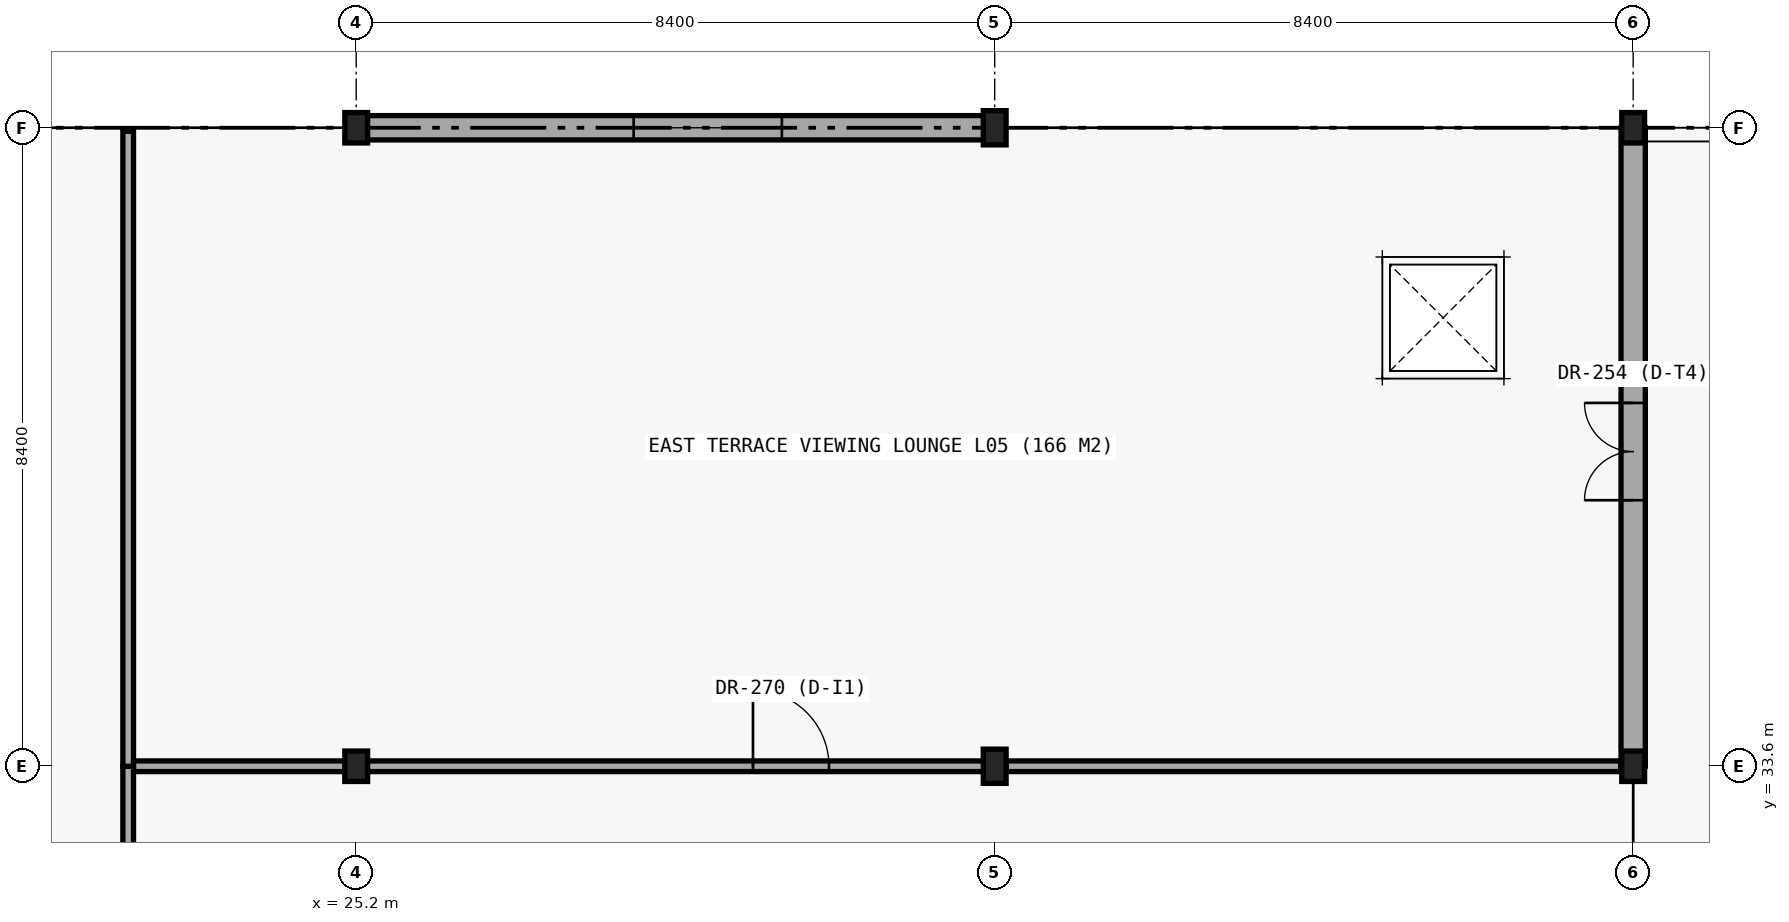
"""IFC4 building model, lengths in metres.
Left out: names, types, materials, properties, quantities, classifications, styles, units other than length and angle.
Written with IfcOpenShell. Run it as: python <this file> out.ifc"""

import sys

from ifc_helpers import new_model, si_unit, direction, frame, frame_2d, origin, origin_2d, place, context, subcontext, project, spatial, rectangle, i_section, extrude, element, fill, save


model = new_model("IFC4")
c1 = context("Model", 3, precision=1e-05, world=origin(), true_north=direction((0.0, 1.0)))
c2 = subcontext(c1, "Body", "Model", "MODEL_VIEW")
j1 = project(units=[si_unit("LENGTHUNIT", "METRE"), si_unit("PLANEANGLEUNIT", "RADIAN")], contexts=[c1])
p1 = place(None, origin())
s1 = spatial("IfcSite", under=j1, at=p1, CompositionType="ELEMENT")
p2 = place(p1, origin())
s2 = spatial("IfcBuilding", under=s1, at=p2, CompositionType="ELEMENT")
p3 = place(p2, frame((0.0, 0.0, 21.6)))
s3 = spatial("IfcBuildingStorey", under=s2, at=p3, CompositionType="ELEMENT", Elevation=21.6)
p4 = place(p3, frame((25.2, 33.6, 0.0), z_axis=(0.0, 0.0, 1.0), x_axis=(1.0, 0.0, 0.0)))
e1 = element("IfcColumn", 1, at=p4, inside=s3, PredefinedType="COLUMN", context=c2, shape_type="SweptSolid", body=[
    extrude(i_section(OverallWidth=0.3, OverallDepth=0.4, WebThickness=0.013, FlangeThickness=0.024, FilletRadius=0.027, at=origin_2d()), origin(), (0.0, 0.0, 1.0), 4.8),
])
p5 = place(p3, frame((25.2, 42.0, 0.0), z_axis=(0.0, 0.0, 1.0), x_axis=(1.0, 0.0, 0.0)))
e2 = element("IfcColumn", 2, at=p5, inside=s3, PredefinedType="COLUMN", context=c2, shape_type="SweptSolid", body=[
    extrude(i_section(OverallWidth=0.3, OverallDepth=0.4, WebThickness=0.013, FlangeThickness=0.024, FilletRadius=0.027, at=origin_2d()), origin(), (0.0, 0.0, 1.0), 4.558),
])
p6 = place(p3, frame((33.6, 33.6, 0.0), z_axis=(0.0, 0.0, 1.0), x_axis=(1.0, 0.0, 0.0)))
e3 = element("IfcColumn", 3, at=p6, inside=s3, PredefinedType="COLUMN", context=c2, shape_type="SweptSolid", body=[
    extrude(i_section(OverallWidth=0.3, OverallDepth=0.45, WebThickness=0.014, FlangeThickness=0.026, FilletRadius=0.027, at=origin_2d()), origin(), (0.0, 0.0, 1.0), 4.8),
])
p7 = place(p3, frame((33.6, 42.0, 0.0), z_axis=(0.0, 0.0, 1.0), x_axis=(1.0, 0.0, 0.0)))
e4 = element("IfcColumn", 4, at=p7, inside=s3, PredefinedType="COLUMN", context=c2, shape_type="SweptSolid", body=[
    extrude(i_section(OverallWidth=0.3, OverallDepth=0.45, WebThickness=0.014, FlangeThickness=0.026, FilletRadius=0.027, at=origin_2d()), origin(), (0.0, 0.0, 1.0), 4.558),
])
p8 = place(p3, frame((42.0, 33.6, 0.0), z_axis=(0.0, 0.0, 1.0), x_axis=(1.0, 0.0, 0.0)))
e5 = element("IfcColumn", 5, at=p8, inside=s3, PredefinedType="COLUMN", context=c2, shape_type="SweptSolid", body=[
    extrude(i_section(OverallWidth=0.3, OverallDepth=0.4, WebThickness=0.013, FlangeThickness=0.024, FilletRadius=0.027, at=origin_2d()), origin(), (0.0, 0.0, 1.0), 4.8),
])
p9 = place(p3, frame((42.0, 42.0, 0.0), z_axis=(0.0, 0.0, 1.0), x_axis=(1.0, 0.0, 0.0)))
e6 = element("IfcColumn", 6, at=p9, inside=s3, PredefinedType="COLUMN", context=c2, shape_type="SweptSolid", body=[
    extrude(i_section(OverallWidth=0.3, OverallDepth=0.4, WebThickness=0.013, FlangeThickness=0.024, FilletRadius=0.027, at=origin_2d()), origin(), (0.0, 0.0, 1.0), 4.558),
])
p10 = place(p3, frame((33.6, 42.0, 0.0), z_axis=(0.0, 0.0, 1.0), x_axis=(-1.0, 0.0, 0.0)))
e7 = element("IfcWall", 7, at=p10, inside=s3, PredefinedType="STANDARD", context=c2, shape_type="SweptSolid", body=[
    extrude(rectangle(XDim=8.4, YDim=0.32, at=frame_2d((4.2, 0.0))), origin(), (0.0, 0.0, 1.0), 4.22),
])
p11 = place(p10, frame((2.8, 0.0, 0.85)))
e8 = element("IfcOpeningElement", 8, at=p11, cuts=e7, PredefinedType="OPENING", context=c2, shape_type="SweptSolid", body=[
    extrude(rectangle(XDim=1.95, YDim=2.3, at=frame_2d((0.975, 1.15))), frame((0.0, 0.17, 0.0), z_axis=(0.0, -1.0, 0.0), x_axis=(1.0, 0.0, 0.0)), (0.0, 0.0, 1.0), 0.34),
])
p12 = place(p3, frame((42.0, 33.6, 0.0), z_axis=(0.0, 0.0, 1.0), x_axis=(0.0, 1.0, 0.0)))
e9 = element("IfcWall", 9, at=p12, inside=s3, PredefinedType="STANDARD", context=c2, shape_type="SweptSolid", body=[
    extrude(rectangle(XDim=8.4, YDim=0.32, at=frame_2d((4.2, 0.0))), origin(), (0.0, 0.0, 1.0), 4.22),
])
p13 = place(p12, frame((3.5, 0.0, 0.0)))
e10 = element("IfcOpeningElement", 10, at=p13, cuts=e9, PredefinedType="OPENING", context=c2, shape_type="SweptSolid", body=[
    extrude(rectangle(XDim=1.28, YDim=2.26, at=frame_2d((0.64, 1.13))), frame((0.0, 0.17, 0.0), z_axis=(0.0, -1.0, 0.0), x_axis=(1.0, 0.0, 0.0)), (0.0, 0.0, 1.0), 0.34),
])
p14 = place(p3, frame((22.2, 33.6, 0.0), z_axis=(0.0, 0.0, 1.0), x_axis=(1.0, 0.0, 0.0)))
e11 = element("IfcWall", 11, at=p14, inside=s3, PredefinedType="PARTITIONING", context=c2, shape_type="SweptSolid", body=[
    extrude(rectangle(XDim=11.4, YDim=0.14, at=frame_2d((5.7, 0.0))), origin(), (0.0, 0.0, 1.0), 4.1),
])
p15 = place(p14, frame((8.22, 0.0, 0.0)))
e12 = element("IfcOpeningElement", 12, at=p15, cuts=e11, PredefinedType="OPENING", context=c2, shape_type="SweptSolid", body=[
    extrude(rectangle(XDim=1.0, YDim=2.15, at=frame_2d((0.5, 1.075))), frame((0.0, 0.08, 0.0), z_axis=(0.0, -1.0, 0.0), x_axis=(1.0, 0.0, 0.0)), (0.0, 0.0, 1.0), 0.16),
])
p16 = place(p3, frame((33.75, 33.6, 0.0), z_axis=(0.0, 0.0, 1.0), x_axis=(1.0, 0.0, 0.0)))
e13 = element("IfcWall", 13, at=p16, inside=s3, PredefinedType="PARTITIONING", context=c2, shape_type="SweptSolid", body=[
    extrude(rectangle(XDim=8.085, YDim=0.14, at=frame_2d((4.042, 0.0))), origin(), (0.0, 0.0, 1.0), 4.1),
])
p17 = place(p3, frame((22.2, 22.0, 0.0), z_axis=(0.0, 0.0, 1.0), x_axis=(0.0, 1.0, 0.0)))
e14 = element("IfcWall", 14, at=p17, inside=s3, PredefinedType="PARTITIONING", context=c2, shape_type="SweptSolid", body=[
    extrude(rectangle(XDim=11.6, YDim=0.14, at=frame_2d((5.8, 0.0))), origin(), (0.0, 0.0, 1.0), 4.1),
])
p18 = place(p17, frame((5.1, 0.0, 0.0)))
e15 = element("IfcOpeningElement", 15, at=p18, cuts=e14, PredefinedType="OPENING", context=c2, shape_type="SweptSolid", body=[
    extrude(rectangle(XDim=1.4, YDim=2.25, at=frame_2d((0.7, 1.125))), frame((0.0, 0.08, 0.0), z_axis=(0.0, -1.0, 0.0), x_axis=(1.0, 0.0, 0.0)), (0.0, 0.0, 1.0), 0.16),
])
p19 = place(p3, frame((22.2, 33.6, 0.0), z_axis=(0.0, 0.0, 1.0), x_axis=(0.0, 1.0, 0.0)))
e16 = element("IfcWall", 16, at=p19, inside=s3, PredefinedType="PARTITIONING", context=c2, shape_type="SweptSolid", body=[
    extrude(rectangle(XDim=8.355, YDim=0.14, at=frame_2d((4.177, 0.0))), origin(), (0.0, 0.0, 1.0), 4.1),
])
p20 = place(p11, origin())
e17 = element("IfcWindow", 17, at=p20, inside=s3, PartitioningType="SINGLE_PANEL", PredefinedType="WINDOW", context=c2, shape_type="SweptSolid", body=[
    extrude(rectangle(XDim=1.95, YDim=2.3, at=frame_2d((0.975, 1.15))), frame((0.0, 0.03, 0.0), z_axis=(0.0, -1.0, 0.0), x_axis=(1.0, 0.0, 0.0)), (0.0, 0.0, 1.0), 0.06),
])
fill(e8, e17)
p21 = place(p13, origin())
e18 = element("IfcDoor", 18, at=p21, inside=s3, OperationType="DOUBLE_DOOR_SINGLE_SWING", PredefinedType="DOOR", context=c2, shape_type="SweptSolid", body=[
    extrude(rectangle(XDim=1.28, YDim=2.26, at=frame_2d((0.64, 1.13))), frame((0.0, 0.025, 0.0), z_axis=(0.0, -1.0, 0.0), x_axis=(1.0, 0.0, 0.0)), (0.0, 0.0, 1.0), 0.05),
])
fill(e10, e18)
p22 = place(p15, origin())
e19 = element("IfcDoor", 19, at=p22, inside=s3, OperationType="SINGLE_SWING_LEFT", PredefinedType="DOOR", context=c2, shape_type="SweptSolid", body=[
    extrude(rectangle(XDim=1.0, YDim=2.15, at=frame_2d((0.5, 1.075))), frame((0.0, 0.025, 0.0), z_axis=(0.0, -1.0, 0.0), x_axis=(1.0, 0.0, 0.0)), (0.0, 0.0, 1.0), 0.05),
])
fill(e12, e19)
save(model, sys.argv[1])
